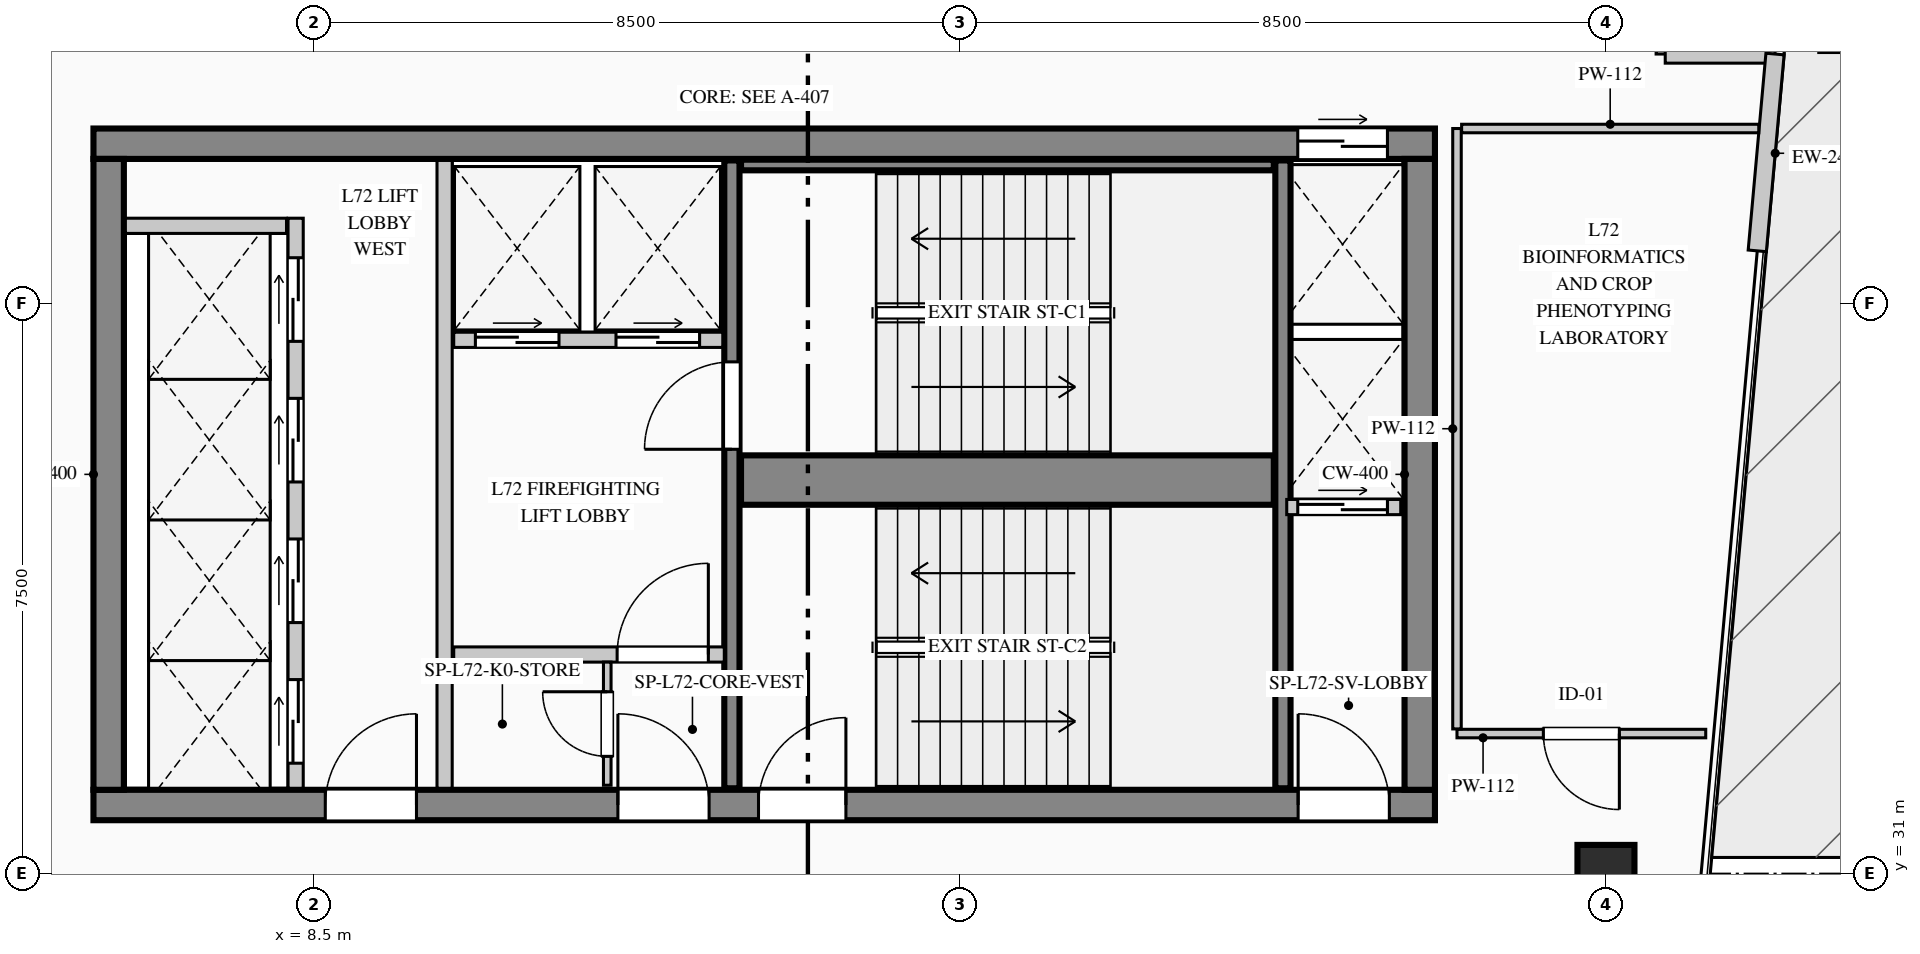
"""IFC4 building model, lengths in metres.
Left out: names, types, materials, properties, quantities, classifications, styles, units other than length and angle.
Written with IfcOpenShell. Run it as: python <this file> out.ifc"""

import sys

from ifc_helpers import new_model, si_unit, direction, frame, frame_2d, origin, origin_2d, place, context, subcontext, project, spatial, rectangle, extrude, element, fill, save


model = new_model("IFC4")
c1 = context("Model", 3, precision=1e-05, world=origin(), true_north=direction((0.0, 1.0)))
c2 = subcontext(c1, "Body", "Model", "MODEL_VIEW")
j1 = project(units=[si_unit("LENGTHUNIT", "METRE"), si_unit("PLANEANGLEUNIT", "RADIAN")], contexts=[c1])
p1 = place(None, origin())
s1 = spatial("IfcSite", under=j1, at=p1, CompositionType="ELEMENT")
p2 = place(p1, origin())
s2 = spatial("IfcBuilding", under=s1, at=p2, CompositionType="ELEMENT")
p3 = place(p2, frame((0.0, 0.0, 300.15)))
s3 = spatial("IfcBuildingStorey", under=s2, at=p3, CompositionType="ELEMENT", Elevation=300.15)
p4 = place(p3, frame((5.6, 40.6, 0.0), z_axis=(0.0, 0.0, 1.0), x_axis=(1.0, 0.0, 0.0)))
e1 = element("IfcWall", 1, at=p4, inside=s3, PredefinedType="SHEAR", context=c2, shape_type="SweptSolid", body=[
    extrude(rectangle(XDim=17.65, YDim=0.4, at=frame_2d((8.825, 0.0))), origin(), (0.0, 0.0, 1.0), 3.95),
])
p5 = place(p4, frame((15.845, 0.0, 0.0)))
e2 = element("IfcOpeningElement", 2, at=p5, cuts=e1, PredefinedType="OPENING", context=c2, shape_type="SweptSolid", body=[
    extrude(rectangle(XDim=1.18, YDim=2.25, at=frame_2d((0.59, 1.125))), frame((0.0, 0.21, 0.0), z_axis=(0.0, -1.0, 0.0), x_axis=(1.0, 0.0, 0.0)), (0.0, 0.0, 1.0), 0.42),
])
p6 = place(p3, frame((5.6, 31.9, 0.0), z_axis=(0.0, 0.0, 1.0), x_axis=(1.0, 0.0, 0.0)))
e3 = element("IfcWall", 3, at=p6, inside=s3, PredefinedType="SHEAR", context=c2, shape_type="SweptSolid", body=[
    extrude(rectangle(XDim=17.65, YDim=0.4, at=frame_2d((8.825, 0.0))), origin(), (0.0, 0.0, 1.0), 3.95),
])
p7 = place(p6, frame((3.05, 0.0, 0.0)))
e4 = element("IfcOpeningElement", 4, at=p7, cuts=e3, PredefinedType="OPENING", context=c2, shape_type="SweptSolid", body=[
    extrude(rectangle(XDim=1.2, YDim=2.2, at=frame_2d((0.6, 1.1))), frame((0.0, 0.21, 0.0), z_axis=(0.0, -1.0, 0.0), x_axis=(1.0, 0.0, 0.0)), (0.0, 0.0, 1.0), 0.42),
])
p8 = place(p6, frame((6.9, 0.0, 0.0)))
e5 = element("IfcOpeningElement", 5, at=p8, cuts=e3, PredefinedType="OPENING", context=c2, shape_type="SweptSolid", body=[
    extrude(rectangle(XDim=1.2, YDim=2.2, at=frame_2d((0.6, 1.1))), frame((0.0, 0.21, 0.0), z_axis=(0.0, -1.0, 0.0), x_axis=(1.0, 0.0, 0.0)), (0.0, 0.0, 1.0), 0.42),
])
p9 = place(p6, frame((8.75, 0.0, 0.0)))
e6 = element("IfcOpeningElement", 6, at=p9, cuts=e3, PredefinedType="OPENING", context=c2, shape_type="SweptSolid", body=[
    extrude(rectangle(XDim=1.15, YDim=2.2, at=frame_2d((0.575, 1.1))), frame((0.0, 0.21, 0.0), z_axis=(0.0, -1.0, 0.0), x_axis=(1.0, 0.0, 0.0)), (0.0, 0.0, 1.0), 0.42),
])
p10 = place(p6, frame((15.85, 0.0, 0.0)))
e7 = element("IfcOpeningElement", 7, at=p10, cuts=e3, PredefinedType="OPENING", context=c2, shape_type="SweptSolid", body=[
    extrude(rectangle(XDim=1.2, YDim=2.2, at=frame_2d((0.6, 1.1))), frame((0.0, 0.21, 0.0), z_axis=(0.0, -1.0, 0.0), x_axis=(1.0, 0.0, 0.0)), (0.0, 0.0, 1.0), 0.42),
])
for number, where, z_axis, x_axis in (
    (8, (5.8, 32.1, 0.0), (0.0, 0.0, 1.0), (0.0, 1.0, 0.0)),
    (9, (23.05, 32.1, 0.0), (0.0, 0.0, 1.0), (0.0, 1.0, 0.0)),
):
    element("IfcWall", number, at=place(p3, frame(where, z_axis=z_axis, x_axis=x_axis)), inside=s3, PredefinedType="SHEAR", context=c2, shape_type="SweptSolid", body=[
        extrude(rectangle(XDim=8.3, YDim=0.4, at=frame_2d((4.15, 0.0))), origin(), (0.0, 0.0, 1.0), 3.95),
    ])
p11 = place(p3, frame((14.0, 32.12, 0.0), z_axis=(0.0, 0.0, 1.0), x_axis=(0.0, 1.0, 0.0)))
e10 = element("IfcWall", 10, at=p11, inside=s3, PredefinedType="SHEAR", context=c2, shape_type="SweptSolid", body=[
    extrude(rectangle(XDim=8.26, YDim=0.2, at=frame_2d((4.13, 0.0))), origin(), (0.0, 0.0, 1.0), 3.95),
])
p12 = place(p11, frame((4.46, 0.0, 0.0)))
e11 = element("IfcOpeningElement", 11, at=p12, cuts=e10, PredefinedType="OPENING", context=c2, shape_type="SweptSolid", body=[
    extrude(rectangle(XDim=1.15, YDim=2.2, at=frame_2d((0.575, 1.1))), frame((0.0, 0.11, 0.0), z_axis=(0.0, -1.0, 0.0), x_axis=(1.0, 0.0, 0.0)), (0.0, 0.0, 1.0), 0.22),
])
p13 = place(p3, frame((14.12, 36.175, 0.0), z_axis=(0.0, 0.0, 1.0), x_axis=(1.0, 0.0, 0.0)))
e12 = element("IfcWall", 12, at=p13, inside=s3, PredefinedType="SHEAR", context=c2, shape_type="SweptSolid", body=[
    extrude(rectangle(XDim=7.01, YDim=0.65, at=frame_2d((3.505, 0.0))), origin(), (0.0, 0.0, 1.0), 3.95),
])
p14 = place(p3, frame((21.25, 32.12, 0.0), z_axis=(0.0, 0.0, 1.0), x_axis=(0.0, 1.0, 0.0)))
e13 = element("IfcWall", 13, at=p14, inside=s3, PredefinedType="SHEAR", context=c2, shape_type="SweptSolid", body=[
    extrude(rectangle(XDim=8.26, YDim=0.2, at=frame_2d((4.13, 0.0))), origin(), (0.0, 0.0, 1.0), 3.95),
])
p15 = place(p3, frame((14.12, 40.32, 0.0), z_axis=(0.0, 0.0, 1.0), x_axis=(1.0, 0.0, 0.0)))
e14 = element("IfcWall", 14, at=p15, inside=s3, PredefinedType="SHEAR", context=c2, shape_type="SweptSolid", body=[
    extrude(rectangle(XDim=7.01, YDim=0.14, at=frame_2d((3.505, 0.0))), origin(), (0.0, 0.0, 1.0), 3.95),
])
p16 = place(p3, frame((25.5, 31.0, 0.0), z_axis=(0.0, 0.0, 1.0), x_axis=(1.0, 0.0, 0.0)))
e15 = element("IfcColumn", 15, at=p16, inside=s3, PredefinedType="COLUMN", context=c2, shape_type="SweptSolid", body=[
    extrude(rectangle(XDim=0.75, YDim=0.75, at=origin_2d()), origin(), (0.0, 0.0, 1.0), 3.95),
])
p17 = place(p3, frame((26.28, 43.38, 0.0), z_axis=(0.0, 0.0, 1.0), x_axis=(0.0, -1.0, 0.0)))
e16 = element("IfcWall", 16, at=p17, inside=s3, PredefinedType="STANDARD", context=c2, shape_type="SweptSolid", body=[
    extrude(rectangle(XDim=1.6, YDim=0.24, at=frame_2d((0.8, 0.0))), origin(), (0.0, 0.0, 1.0), 3.7),
])
p18 = place(p3, frame((26.28, 41.78, 0.0), z_axis=(0.0, 0.0, 1.0), x_axis=(1.0, 0.0, 0.0)))
e17 = element("IfcWall", 17, at=p18, inside=s3, PredefinedType="STANDARD", context=c2, shape_type="SweptSolid", body=[
    extrude(rectangle(XDim=1.444, YDim=0.24, at=frame_2d((0.722, 0.0))), origin(), (0.0, 0.0, 1.0), 3.7),
])
p19 = place(p3, frame((27.724, 41.78, 0.0), z_axis=(0.0, 0.0, 1.0), x_axis=(-0.089765303723, -0.995962946222, 0.0)))
e18 = element("IfcWall", 18, at=p19, inside=s3, PredefinedType="STANDARD", context=c2, shape_type="SweptSolid", body=[
    extrude(rectangle(XDim=2.6, YDim=0.24, at=frame_2d((1.3, 0.0))), origin(), (0.0, 0.0, 1.0), 3.7),
])
p20 = place(p3, frame((8.26, 32.12, 0.0), z_axis=(0.0, 0.0, 1.0), x_axis=(0.0, 1.0, 0.0)))
e19 = element("IfcWall", 19, at=p20, inside=s3, PredefinedType="PARTITIONING", context=c2, shape_type="SweptSolid", body=[
    extrude(rectangle(XDim=7.5, YDim=0.2, at=frame_2d((3.75, 0.0))), origin(), (0.0, 0.0, 1.0), 3.7),
])
p21 = place(p20, frame((0.33, 0.0, 0.0)))
e20 = element("IfcOpeningElement", 20, at=p21, cuts=e19, PredefinedType="OPENING", context=c2, shape_type="SweptSolid", body=[
    extrude(rectangle(XDim=1.1, YDim=2.2, at=frame_2d((0.55, 1.1))), frame((0.0, 0.11, 0.0), z_axis=(0.0, -1.0, 0.0), x_axis=(1.0, 0.0, 0.0)), (0.0, 0.0, 1.0), 0.22),
])
p22 = place(p20, frame((2.18, 0.0, 0.0)))
e21 = element("IfcOpeningElement", 21, at=p22, cuts=e19, PredefinedType="OPENING", context=c2, shape_type="SweptSolid", body=[
    extrude(rectangle(XDim=1.1, YDim=2.2, at=frame_2d((0.55, 1.1))), frame((0.0, 0.11, 0.0), z_axis=(0.0, -1.0, 0.0), x_axis=(1.0, 0.0, 0.0)), (0.0, 0.0, 1.0), 0.22),
])
p23 = place(p20, frame((4.03, 0.0, 0.0)))
e22 = element("IfcOpeningElement", 22, at=p23, cuts=e19, PredefinedType="OPENING", context=c2, shape_type="SweptSolid", body=[
    extrude(rectangle(XDim=1.1, YDim=2.2, at=frame_2d((0.55, 1.1))), frame((0.0, 0.11, 0.0), z_axis=(0.0, -1.0, 0.0), x_axis=(1.0, 0.0, 0.0)), (0.0, 0.0, 1.0), 0.22),
])
p24 = place(p20, frame((5.88, 0.0, 0.0)))
e23 = element("IfcOpeningElement", 23, at=p24, cuts=e19, PredefinedType="OPENING", context=c2, shape_type="SweptSolid", body=[
    extrude(rectangle(XDim=1.1, YDim=2.2, at=frame_2d((0.55, 1.1))), frame((0.0, 0.11, 0.0), z_axis=(0.0, -1.0, 0.0), x_axis=(1.0, 0.0, 0.0)), (0.0, 0.0, 1.0), 0.22),
])
p25 = place(p3, frame((6.02, 39.52, 0.0), z_axis=(0.0, 0.0, 1.0), x_axis=(1.0, 0.0, 0.0)))
e24 = element("IfcWall", 24, at=p25, inside=s3, PredefinedType="PARTITIONING", context=c2, shape_type="SweptSolid", body=[
    extrude(rectangle(XDim=2.12, YDim=0.2, at=frame_2d((1.06, 0.0))), origin(), (0.0, 0.0, 1.0), 3.7),
])
p26 = place(p3, frame((10.22, 32.12, 0.0), z_axis=(0.0, 0.0, 1.0), x_axis=(0.0, 1.0, 0.0)))
e25 = element("IfcWall", 25, at=p26, inside=s3, PredefinedType="PARTITIONING", context=c2, shape_type="SweptSolid", body=[
    extrude(rectangle(XDim=8.26, YDim=0.2, at=frame_2d((4.13, 0.0))), origin(), (0.0, 0.0, 1.0), 3.7),
])
p27 = place(p3, frame((10.34, 38.02, 0.0), z_axis=(0.0, 0.0, 1.0), x_axis=(1.0, 0.0, 0.0)))
e26 = element("IfcWall", 26, at=p27, inside=s3, PredefinedType="PARTITIONING", context=c2, shape_type="SweptSolid", body=[
    extrude(rectangle(XDim=3.54, YDim=0.2, at=frame_2d((1.77, 0.0))), origin(), (0.0, 0.0, 1.0), 3.7),
])
p28 = place(p27, frame((0.285, 0.0, 0.0)))
e27 = element("IfcOpeningElement", 27, at=p28, cuts=e26, PredefinedType="OPENING", context=c2, shape_type="SweptSolid", body=[
    extrude(rectangle(XDim=1.1, YDim=2.2, at=frame_2d((0.55, 1.1))), frame((0.0, 0.11, 0.0), z_axis=(0.0, -1.0, 0.0), x_axis=(1.0, 0.0, 0.0)), (0.0, 0.0, 1.0), 0.22),
])
p29 = place(p27, frame((2.135, 0.0, 0.0)))
e28 = element("IfcOpeningElement", 28, at=p29, cuts=e26, PredefinedType="OPENING", context=c2, shape_type="SweptSolid", body=[
    extrude(rectangle(XDim=1.1, YDim=2.2, at=frame_2d((0.55, 1.1))), frame((0.0, 0.11, 0.0), z_axis=(0.0, -1.0, 0.0), x_axis=(1.0, 0.0, 0.0)), (0.0, 0.0, 1.0), 0.22),
])
p30 = place(p3, frame((10.34, 33.88, 0.0), z_axis=(0.0, 0.0, 1.0), x_axis=(1.0, 0.0, 0.0)))
e29 = element("IfcWall", 29, at=p30, inside=s3, PredefinedType="PARTITIONING", context=c2, shape_type="SweptSolid", body=[
    extrude(rectangle(XDim=3.56, YDim=0.2, at=frame_2d((1.78, 0.0))), origin(), (0.0, 0.0, 1.0), 3.7),
])
p31 = place(p30, frame((2.15, 0.0, 0.0)))
e30 = element("IfcOpeningElement", 30, at=p31, cuts=e29, PredefinedType="OPENING", context=c2, shape_type="SweptSolid", body=[
    extrude(rectangle(XDim=1.2, YDim=2.2, at=frame_2d((0.6, 1.1))), frame((0.0, 0.11, 0.0), z_axis=(0.0, -1.0, 0.0), x_axis=(1.0, 0.0, 0.0)), (0.0, 0.0, 1.0), 0.22),
])
p32 = place(p3, frame((12.36, 32.16, 0.0), z_axis=(0.0, 0.0, 1.0), x_axis=(0.0, 1.0, 0.0)))
e31 = element("IfcWall", 31, at=p32, inside=s3, PredefinedType="PARTITIONING", context=c2, shape_type="SweptSolid", body=[
    extrude(rectangle(XDim=1.62, YDim=0.1, at=frame_2d((0.81, 0.0))), origin(), (0.0, 0.0, 1.0), 3.7),
])
p33 = place(p32, frame((0.38, 0.0, 0.0)))
e32 = element("IfcOpeningElement", 32, at=p33, cuts=e31, PredefinedType="OPENING", context=c2, shape_type="SweptSolid", body=[
    extrude(rectangle(XDim=0.85, YDim=2.1, at=frame_2d((0.425, 1.05))), frame((0.0, 0.06, 0.0), z_axis=(0.0, -1.0, 0.0), x_axis=(1.0, 0.0, 0.0)), (0.0, 0.0, 1.0), 0.12),
])
p34 = place(p3, frame((21.3, 35.82, 0.0), z_axis=(0.0, 0.0, 1.0), x_axis=(1.0, 0.0, 0.0)))
e33 = element("IfcWall", 33, at=p34, inside=s3, PredefinedType="PARTITIONING", context=c2, shape_type="SweptSolid", body=[
    extrude(rectangle(XDim=1.5, YDim=0.2, at=frame_2d((0.75, 0.0))), origin(), (0.0, 0.0, 1.0), 3.7),
])
p35 = place(p34, frame((0.145, 0.0, 0.0)))
e34 = element("IfcOpeningElement", 34, at=p35, cuts=e33, PredefinedType="OPENING", context=c2, shape_type="SweptSolid", body=[
    extrude(rectangle(XDim=1.18, YDim=2.25, at=frame_2d((0.59, 1.125))), frame((0.0, 0.11, 0.0), z_axis=(0.0, -1.0, 0.0), x_axis=(1.0, 0.0, 0.0)), (0.0, 0.0, 1.0), 0.22),
])
p36 = place(p3, frame((26.813, 32.84, 0.0), z_axis=(0.0, 0.0, 1.0), x_axis=(-1.0, 0.0, 0.0)))
e35 = element("IfcWall", 35, at=p36, inside=s3, PredefinedType="PARTITIONING", context=c2, shape_type="SweptSolid", body=[
    extrude(rectangle(XDim=3.273, YDim=0.112, at=frame_2d((1.636, 0.0))), origin(), (0.0, 0.0, 1.0), 3.7),
])
p37 = place(p36, frame((1.136, 0.0, 0.0)))
e36 = element("IfcOpeningElement", 36, at=p37, cuts=e35, PredefinedType="OPENING", context=c2, shape_type="SweptSolid", body=[
    extrude(rectangle(XDim=1.0, YDim=2.15, at=frame_2d((0.5, 1.075))), frame((0.0, 0.066, 0.0), z_axis=(0.0, -1.0, 0.0), x_axis=(1.0, 0.0, 0.0)), (0.0, 0.0, 1.0), 0.132),
])
p38 = place(p3, frame((23.54, 32.901, 0.0), z_axis=(0.0, 0.0, 1.0), x_axis=(0.0, 1.0, 0.0)))
e37 = element("IfcWall", 37, at=p38, inside=s3, PredefinedType="PARTITIONING", context=c2, shape_type="SweptSolid", body=[
    extrude(rectangle(XDim=7.899, YDim=0.112, at=frame_2d((3.95, 0.0))), origin(), (0.0, 0.0, 1.0), 3.7),
])
p39 = place(p3, frame((23.601, 40.8, 0.0), z_axis=(0.0, 0.0, 1.0), x_axis=(1.0, 0.0, 0.0)))
e38 = element("IfcWall", 38, at=p39, inside=s3, PredefinedType="PARTITIONING", context=c2, shape_type="SweptSolid", body=[
    extrude(rectangle(XDim=3.909, YDim=0.112, at=frame_2d((1.955, 0.0))), origin(), (0.0, 0.0, 1.0), 3.7),
])
p40 = place(p7, origin())
e39 = element("IfcDoor", 39, at=p40, inside=s3, OperationType="SINGLE_SWING_RIGHT", PredefinedType="DOOR", context=c2, shape_type="SweptSolid", body=[
    extrude(rectangle(XDim=1.2, YDim=2.2, at=frame_2d((0.6, 1.1))), frame((0.0, 0.025, 0.0), z_axis=(0.0, -1.0, 0.0), x_axis=(1.0, 0.0, 0.0)), (0.0, 0.0, 1.0), 0.05),
])
fill(e4, e39)
p41 = place(p8, origin())
e40 = element("IfcDoor", 40, at=p41, inside=s3, OperationType="SINGLE_SWING_LEFT", PredefinedType="DOOR", context=c2, shape_type="SweptSolid", body=[
    extrude(rectangle(XDim=1.2, YDim=2.2, at=frame_2d((0.6, 1.1))), frame((0.0, 0.025, 0.0), z_axis=(0.0, -1.0, 0.0), x_axis=(1.0, 0.0, 0.0)), (0.0, 0.0, 1.0), 0.05),
])
fill(e5, e40)
p42 = place(p9, origin())
e41 = element("IfcDoor", 41, at=p42, inside=s3, OperationType="SINGLE_SWING_RIGHT", PredefinedType="DOOR", context=c2, shape_type="SweptSolid", body=[
    extrude(rectangle(XDim=1.15, YDim=2.2, at=frame_2d((0.575, 1.1))), frame((0.0, 0.025, 0.0), z_axis=(0.0, -1.0, 0.0), x_axis=(1.0, 0.0, 0.0)), (0.0, 0.0, 1.0), 0.05),
])
fill(e6, e41)
p43 = place(p10, origin())
e42 = element("IfcDoor", 42, at=p43, inside=s3, OperationType="SINGLE_SWING_LEFT", PredefinedType="DOOR", context=c2, shape_type="SweptSolid", body=[
    extrude(rectangle(XDim=1.2, YDim=2.2, at=frame_2d((0.6, 1.1))), frame((0.0, 0.025, 0.0), z_axis=(0.0, -1.0, 0.0), x_axis=(1.0, 0.0, 0.0)), (0.0, 0.0, 1.0), 0.05),
])
fill(e7, e42)
p44 = place(p31, origin())
e43 = element("IfcDoor", 43, at=p44, inside=s3, OperationType="SINGLE_SWING_RIGHT", PredefinedType="DOOR", context=c2, shape_type="SweptSolid", body=[
    extrude(rectangle(XDim=1.2, YDim=2.2, at=frame_2d((0.6, 1.1))), frame((0.0, 0.025, 0.0), z_axis=(0.0, -1.0, 0.0), x_axis=(1.0, 0.0, 0.0)), (0.0, 0.0, 1.0), 0.05),
])
fill(e30, e43)
p45 = place(p33, origin())
e44 = element("IfcDoor", 44, at=p45, inside=s3, OperationType="SINGLE_SWING_RIGHT", PredefinedType="DOOR", context=c2, shape_type="SweptSolid", body=[
    extrude(rectangle(XDim=0.85, YDim=2.1, at=frame_2d((0.425, 1.05))), frame((0.0, 0.025, 0.0), z_axis=(0.0, -1.0, 0.0), x_axis=(1.0, 0.0, 0.0)), (0.0, 0.0, 1.0), 0.05),
])
fill(e32, e44)
p46 = place(p12, origin())
e45 = element("IfcDoor", 45, at=p46, inside=s3, OperationType="SINGLE_SWING_LEFT", PredefinedType="DOOR", context=c2, shape_type="SweptSolid", body=[
    extrude(rectangle(XDim=1.15, YDim=2.2, at=frame_2d((0.575, 1.1))), frame((0.0, 0.025, 0.0), z_axis=(0.0, -1.0, 0.0), x_axis=(1.0, 0.0, 0.0)), (0.0, 0.0, 1.0), 0.05),
])
fill(e11, e45)
p47 = place(p21, origin())
e46 = element("IfcDoor", 46, at=p47, inside=s3, OperationType="DOUBLE_DOOR_SLIDING", PredefinedType="DOOR", context=c2, shape_type="SweptSolid", body=[
    extrude(rectangle(XDim=1.1, YDim=2.2, at=frame_2d((0.55, 1.1))), frame((0.0, 0.025, 0.0), z_axis=(0.0, -1.0, 0.0), x_axis=(1.0, 0.0, 0.0)), (0.0, 0.0, 1.0), 0.05),
])
fill(e20, e46)
p48 = place(p22, origin())
e47 = element("IfcDoor", 47, at=p48, inside=s3, OperationType="DOUBLE_DOOR_SLIDING", PredefinedType="DOOR", context=c2, shape_type="SweptSolid", body=[
    extrude(rectangle(XDim=1.1, YDim=2.2, at=frame_2d((0.55, 1.1))), frame((0.0, 0.025, 0.0), z_axis=(0.0, -1.0, 0.0), x_axis=(1.0, 0.0, 0.0)), (0.0, 0.0, 1.0), 0.05),
])
fill(e21, e47)
p49 = place(p23, origin())
e48 = element("IfcDoor", 48, at=p49, inside=s3, OperationType="DOUBLE_DOOR_SLIDING", PredefinedType="DOOR", context=c2, shape_type="SweptSolid", body=[
    extrude(rectangle(XDim=1.1, YDim=2.2, at=frame_2d((0.55, 1.1))), frame((0.0, 0.025, 0.0), z_axis=(0.0, -1.0, 0.0), x_axis=(1.0, 0.0, 0.0)), (0.0, 0.0, 1.0), 0.05),
])
fill(e22, e48)
p50 = place(p24, origin())
e49 = element("IfcDoor", 49, at=p50, inside=s3, OperationType="DOUBLE_DOOR_SLIDING", PredefinedType="DOOR", context=c2, shape_type="SweptSolid", body=[
    extrude(rectangle(XDim=1.1, YDim=2.2, at=frame_2d((0.55, 1.1))), frame((0.0, 0.025, 0.0), z_axis=(0.0, -1.0, 0.0), x_axis=(1.0, 0.0, 0.0)), (0.0, 0.0, 1.0), 0.05),
])
fill(e23, e49)
p51 = place(p28, origin())
e50 = element("IfcDoor", 50, at=p51, inside=s3, OperationType="DOUBLE_DOOR_SLIDING", PredefinedType="DOOR", context=c2, shape_type="SweptSolid", body=[
    extrude(rectangle(XDim=1.1, YDim=2.2, at=frame_2d((0.55, 1.1))), frame((0.0, 0.025, 0.0), z_axis=(0.0, -1.0, 0.0), x_axis=(1.0, 0.0, 0.0)), (0.0, 0.0, 1.0), 0.05),
])
fill(e27, e50)
p52 = place(p29, origin())
e51 = element("IfcDoor", 51, at=p52, inside=s3, OperationType="DOUBLE_DOOR_SLIDING", PredefinedType="DOOR", context=c2, shape_type="SweptSolid", body=[
    extrude(rectangle(XDim=1.1, YDim=2.2, at=frame_2d((0.55, 1.1))), frame((0.0, 0.025, 0.0), z_axis=(0.0, -1.0, 0.0), x_axis=(1.0, 0.0, 0.0)), (0.0, 0.0, 1.0), 0.05),
])
fill(e28, e51)
p53 = place(p5, origin())
e52 = element("IfcDoor", 52, at=p53, inside=s3, OperationType="DOUBLE_DOOR_SLIDING", PredefinedType="DOOR", context=c2, shape_type="SweptSolid", body=[
    extrude(rectangle(XDim=1.18, YDim=2.25, at=frame_2d((0.59, 1.125))), frame((0.0, 0.025, 0.0), z_axis=(0.0, -1.0, 0.0), x_axis=(1.0, 0.0, 0.0)), (0.0, 0.0, 1.0), 0.05),
])
fill(e2, e52)
p54 = place(p35, origin())
e53 = element("IfcDoor", 53, at=p54, inside=s3, OperationType="DOUBLE_DOOR_SLIDING", PredefinedType="DOOR", context=c2, shape_type="SweptSolid", body=[
    extrude(rectangle(XDim=1.18, YDim=2.25, at=frame_2d((0.59, 1.125))), frame((0.0, 0.025, 0.0), z_axis=(0.0, -1.0, 0.0), x_axis=(1.0, 0.0, 0.0)), (0.0, 0.0, 1.0), 0.05),
])
fill(e34, e53)
p55 = place(p37, origin())
e54 = element("IfcDoor", 54, at=p55, inside=s3, OperationType="SINGLE_SWING_LEFT", PredefinedType="DOOR", context=c2, shape_type="SweptSolid", body=[
    extrude(rectangle(XDim=1.0, YDim=2.15, at=frame_2d((0.5, 1.075))), frame((0.0, 0.025, 0.0), z_axis=(0.0, -1.0, 0.0), x_axis=(1.0, 0.0, 0.0)), (0.0, 0.0, 1.0), 0.05),
])
fill(e36, e54)
save(model, sys.argv[1])
